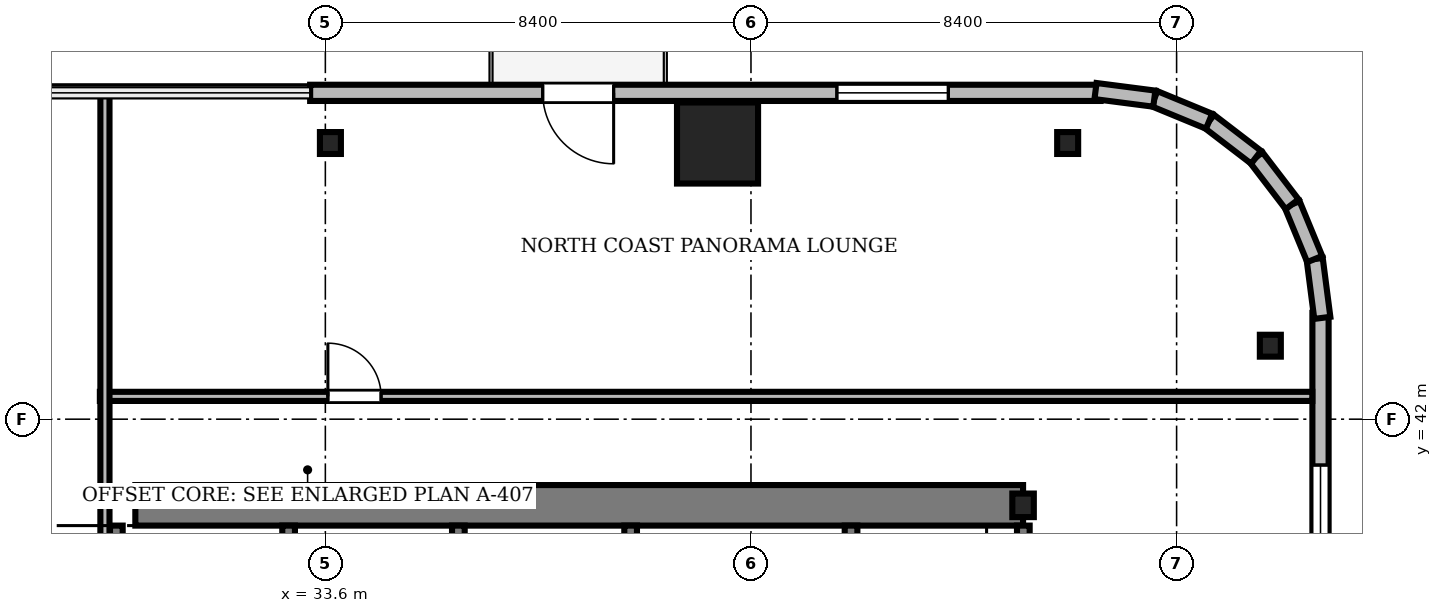
"""IFC4 building model, lengths in metres.
Left out: names, types, materials, properties, quantities, classifications, styles, units other than length and angle.
Written with IfcOpenShell. Run it as: python <this file> out.ifc"""

import sys

from ifc_helpers import new_model, si_unit, direction, frame, frame_2d, origin, origin_2d, place, context, subcontext, project, spatial, rectangle, i_section, extrude, source, transform, mapped, element, fill, save


model = new_model("IFC4")
c1 = context("Model", 3, precision=1e-05, world=origin(), true_north=direction((0.0, 1.0)))
c2 = subcontext(c1, "Body", "Model", "MODEL_VIEW")
j1 = project(units=[si_unit("LENGTHUNIT", "METRE"), si_unit("PLANEANGLEUNIT", "RADIAN")], contexts=[c1])
p1 = place(None, origin())
s1 = spatial("IfcSite", under=j1, at=p1, CompositionType="ELEMENT")
p2 = place(p1, origin())
s2 = spatial("IfcBuilding", under=s1, at=p2, CompositionType="ELEMENT")
p3 = place(p2, frame((0.0, 0.0, 107.5)))
s3 = spatial("IfcBuildingStorey", under=s2, at=p3, CompositionType="ELEMENT", Elevation=107.5)
m1 = source(origin(), c2, "Body", "SweptSolid", [
    extrude(rectangle(XDim=17.52, YDim=0.8, at=frame_2d((8.76, 0.0))), origin(), (0.0, 0.0, 1.0), 3.56),
])
p4 = place(p3, frame((29.85, 40.3, 0.0), z_axis=(0.0, 0.0, 1.0), x_axis=(1.0, 0.0, 0.0)))
e1 = element("IfcWall", 1, at=p4, inside=s3, PredefinedType="SHEAR", context=c2, shape_type="MappedRepresentation", body=[
    mapped(m1, transform((0.0, 0.0, 0.0), scale=1.0)),
])
m2 = source(origin(), c2, "Body", "SweptSolid", [
    extrude(i_section(OverallWidth=0.424, OverallDepth=0.465, WebThickness=0.035, FlangeThickness=0.056, FilletRadius=0.015, at=origin_2d()), origin(), (0.0, 0.0, 1.0), 3.56),
])
p5 = place(p3, frame((47.37, 40.3, 0.0), z_axis=(0.0, 0.0, 1.0), x_axis=(1.0, 0.0, 0.0)))
e2 = element("IfcColumn", 2, at=p5, inside=s3, PredefinedType="COLUMN", context=c2, shape_type="MappedRepresentation", body=[
    mapped(m2, transform((0.0, 0.0, 0.0), scale=1.0)),
])
m3 = source(origin(), c2, "Body", "SweptSolid", [
    extrude(rectangle(XDim=1.6, YDim=1.6, at=origin_2d()), origin(), (0.0, 0.0, 1.0), 3.56),
])
p6 = place(p3, frame((41.34, 47.45, 0.0), z_axis=(0.0, 0.0, 1.0), x_axis=(1.0, 0.0, 0.0)))
e3 = element("IfcColumn", 3, at=p6, inside=s3, PredefinedType="COLUMN", context=c2, shape_type="MappedRepresentation", body=[
    mapped(m3, transform((0.0, 0.0, 0.0), scale=1.0)),
])
m4 = source(origin(), c2, "Body", "SweptSolid", [
    extrude(i_section(OverallWidth=0.414, OverallDepth=0.432, WebThickness=0.026, FlangeThickness=0.04, FilletRadius=0.015, at=origin_2d()), origin(), (0.0, 0.0, 1.0), 3.56),
])
for number, where, z_axis, x_axis in (
    (4, (52.25, 43.45, 0.0), (0.0, 0.0, 1.0), (1.0, 0.0, 0.0)),
    (5, (48.25, 47.45, 0.0), (0.0, 0.0, 1.0), (1.0, 0.0, 0.0)),
    (6, (33.7, 47.45, 0.0), (0.0, 0.0, 1.0), (1.0, 0.0, 0.0)),
):
    element("IfcColumn", number, at=place(p3, frame(where, z_axis=z_axis, x_axis=x_axis)), inside=s3, PredefinedType="COLUMN", context=c2, shape_type="MappedRepresentation", body=[
        mapped(m4, transform((0.0, 0.0, 0.0), scale=1.0)),
    ])
m5 = source(origin(), c2, "Body", "SweptSolid", [
    extrude(rectangle(XDim=15.6, YDim=0.32, at=frame_2d((7.8, 0.0))), origin(), (0.0, 0.0, 1.0), 3.56),
])
p7 = place(p3, frame((48.9, 48.44, 0.0), z_axis=(0.0, 0.0, 1.0), x_axis=(-1.0, 0.0, 0.0)))
e7 = element("IfcWall", 7, at=p7, inside=s3, PredefinedType="SOLIDWALL", context=c2, shape_type="MappedRepresentation", body=[
    mapped(m5, transform((0.0, 0.0, 0.0), scale=1.0)),
])
m6 = source(origin(), c2, "Body", "SweptSolid", [
    extrude(rectangle(XDim=1.4, YDim=2.3, at=frame_2d((0.7, 1.15))), frame((0.0, 0.17, 0.0), z_axis=(0.0, -1.0, 0.0), x_axis=(1.0, 0.0, 0.0)), (0.0, 0.0, 1.0), 0.34),
])
p8 = place(p7, frame((9.61, 0.0, 0.0)))
e8 = element("IfcOpeningElement", 8, at=p8, cuts=e7, PredefinedType="OPENING", context=c2, shape_type="MappedRepresentation", body=[
    mapped(m6, transform((0.0, 0.0, 0.0), scale=1.0)),
])
m7 = source(origin(), c2, "Body", "SweptSolid", [
    extrude(rectangle(XDim=2.2, YDim=2.4, at=frame_2d((1.1, 1.2))), frame((0.0, 0.17, 0.0), z_axis=(0.0, -1.0, 0.0), x_axis=(1.0, 0.0, 0.0)), (0.0, 0.0, 1.0), 0.34),
])
p9 = place(p7, frame((3.005, 0.0, 0.72)))
e9 = element("IfcOpeningElement", 9, at=p9, cuts=e7, PredefinedType="OPENING", context=c2, shape_type="MappedRepresentation", body=[
    mapped(m7, transform((0.0, 0.0, 0.0), scale=1.0)),
])
m8 = source(origin(), c2, "Body", "SweptSolid", [
    extrude(rectangle(XDim=15.6, YDim=0.32, at=frame_2d((7.8, 0.0))), origin(), (0.0, 0.0, 1.0), 3.56),
])
p10 = place(p3, frame((53.24, 28.5, 0.0), z_axis=(0.0, 0.0, 1.0), x_axis=(0.0, 1.0, 0.0)))
e10 = element("IfcWall", 10, at=p10, inside=s3, PredefinedType="SOLIDWALL", context=c2, shape_type="MappedRepresentation", body=[
    mapped(m8, transform((0.0, 0.0, 0.0), scale=1.0)),
])
p11 = place(p10, frame((10.395, 0.0, 0.72)))
e11 = element("IfcOpeningElement", 11, at=p11, cuts=e10, PredefinedType="OPENING", context=c2, shape_type="MappedRepresentation", body=[
    mapped(m7, transform((0.0, 0.0, 0.0), scale=1.0)),
])
m9 = source(origin(), c2, "Body", "SweptSolid", [
    extrude(rectangle(XDim=1.17, YDim=0.32, at=frame_2d((0.585, 0.0))), origin(), (0.0, 0.0, 1.0), 3.56),
])
p12 = place(p3, frame((53.276, 44.0, 0.0), z_axis=(0.0, 0.0, 1.0), x_axis=(-0.128295670475, 0.991735963317, 0.0)))
e12 = element("IfcWall", 12, at=p12, inside=s3, PredefinedType="SOLIDWALL", context=c2, shape_type="MappedRepresentation", body=[
    mapped(m9, transform((0.0, 0.0, 0.0), scale=1.0)),
])
m10 = source(origin(), c2, "Body", "SweptSolid", [
    extrude(rectangle(XDim=1.169, YDim=0.32, at=frame_2d((0.584, 0.0))), origin(), (0.0, 0.0, 1.0), 3.56),
])
p13 = place(p3, frame((53.125, 45.16, 0.0), z_axis=(0.0, 0.0, 1.0), x_axis=(-0.381054331552, 0.924552646638, 0.0)))
e13 = element("IfcWall", 13, at=p13, inside=s3, PredefinedType="SOLIDWALL", context=c2, shape_type="MappedRepresentation", body=[
    mapped(m10, transform((0.0, 0.0, 0.0), scale=1.0)),
])
m11 = source(origin(), c2, "Body", "SweptSolid", [
    extrude(rectangle(XDim=1.169, YDim=0.32, at=frame_2d((0.584, 0.0))), origin(), (0.0, 0.0, 1.0), 3.56),
])
p14 = place(p3, frame((52.68, 46.241, 0.0), z_axis=(0.0, 0.0, 1.0), x_axis=(-0.608387696831, 0.793639975269, 0.0)))
e14 = element("IfcWall", 14, at=p14, inside=s3, PredefinedType="SOLIDWALL", context=c2, shape_type="MappedRepresentation", body=[
    mapped(m11, transform((0.0, 0.0, 0.0), scale=1.0)),
])
m12 = source(origin(), c2, "Body", "SweptSolid", [
    extrude(rectangle(XDim=1.169, YDim=0.32, at=frame_2d((0.584, 0.0))), origin(), (0.0, 0.0, 1.0), 3.56),
])
p15 = place(p3, frame((51.969, 47.169, 0.0), z_axis=(0.0, 0.0, 1.0), x_axis=(-0.793663520347, 0.608356981114, 0.0)))
e15 = element("IfcWall", 15, at=p15, inside=s3, PredefinedType="SOLIDWALL", context=c2, shape_type="MappedRepresentation", body=[
    mapped(m12, transform((0.0, 0.0, 0.0), scale=1.0)),
])
p16 = place(p3, frame((51.041, 47.88, 0.0), z_axis=(0.0, 0.0, 1.0), x_axis=(-0.924552646638, 0.381054331552, 0.0)))
e16 = element("IfcWall", 16, at=p16, inside=s3, PredefinedType="SOLIDWALL", context=c2, shape_type="MappedRepresentation", body=[
    mapped(m10, transform((0.0, 0.0, 0.0), scale=1.0)),
])
p17 = place(p3, frame((49.96, 48.325, 0.0), z_axis=(0.0, 0.0, 1.0), x_axis=(-0.991735963317, 0.128295670475, 0.0)))
e17 = element("IfcWall", 17, at=p17, inside=s3, PredefinedType="SOLIDWALL", context=c2, shape_type="MappedRepresentation", body=[
    mapped(m9, transform((0.0, 0.0, 0.0), scale=1.0)),
])
m13 = source(origin(), c2, "Body", "SweptSolid", [
    extrude(rectangle(XDim=9.25, YDim=0.25, at=frame_2d((4.625, 0.0))), origin(), (0.0, 0.0, 1.0), 3.6),
])
for number, where, z_axis, x_axis in (
    (18, (29.475, 30.65, 0.0), (0.0, 0.0, 1.0), (0.0, 1.0, 0.0)),
    (19, (32.875, 30.65, 0.0), (0.0, 0.0, 1.0), (0.0, 1.0, 0.0)),
    (20, (36.225, 30.65, 0.0), (0.0, 0.0, 1.0), (0.0, 1.0, 0.0)),
    (21, (39.625, 30.65, 0.0), (0.0, 0.0, 1.0), (0.0, 1.0, 0.0)),
    (22, (43.975, 30.65, 0.0), (0.0, 0.0, 1.0), (0.0, 1.0, 0.0)),
    (23, (47.375, 30.65, 0.0), (0.0, 0.0, 1.0), (0.0, 1.0, 0.0)),
):
    element("IfcWall", number, at=place(p3, frame(where, z_axis=z_axis, x_axis=x_axis)), inside=s3, PredefinedType="SOLIDWALL", context=c2, shape_type="MappedRepresentation", body=[
        mapped(m13, transform((0.0, 0.0, 0.0), scale=1.0)),
    ])
m14 = source(origin(), c2, "Body", "SweptSolid", [
    extrude(rectangle(XDim=23.928, YDim=0.18, at=frame_2d((11.964, 0.0))), origin(), (0.0, 0.0, 1.0), 2.802),
])
p18 = place(p3, frame((29.15, 42.45, 0.0), z_axis=(0.0, 0.0, 1.0), x_axis=(1.0, 0.0, 0.0)))
e24 = element("IfcWall", 24, at=p18, inside=s3, PredefinedType="PARTITIONING", context=c2, shape_type="MappedRepresentation", body=[
    mapped(m14, transform((0.0, 0.0, 0.0), scale=1.0)),
])
m15 = source(origin(), c2, "Body", "SweptSolid", [
    extrude(rectangle(XDim=1.05, YDim=2.2, at=frame_2d((0.525, 1.1))), frame((0.0, 0.1, 0.0), z_axis=(0.0, -1.0, 0.0), x_axis=(1.0, 0.0, 0.0)), (0.0, 0.0, 1.0), 0.2),
])
p19 = place(p18, frame((4.5, 0.0, 0.0)))
e25 = element("IfcOpeningElement", 25, at=p19, cuts=e24, PredefinedType="OPENING", context=c2, shape_type="MappedRepresentation", body=[
    mapped(m15, transform((0.0, 0.0, 0.0), scale=1.0)),
])
m16 = source(origin(), c2, "Body", "SweptSolid", [
    extrude(rectangle(XDim=11.45, YDim=0.18, at=frame_2d((5.725, 0.0))), origin(), (0.0, 0.0, 1.0), 2.802),
])
p20 = place(p3, frame((29.25, 37.02, 0.0), z_axis=(0.0, 0.0, 1.0), x_axis=(0.0, 1.0, 0.0)))
e26 = element("IfcWall", 26, at=p20, inside=s3, PredefinedType="PARTITIONING", context=c2, shape_type="MappedRepresentation", body=[
    mapped(m16, transform((0.0, 0.0, 0.0), scale=1.0)),
])
m17 = source(origin(), c2, "Body", "SweptSolid", [
    extrude(rectangle(XDim=1.4, YDim=2.3, at=frame_2d((0.7, 1.15))), frame((0.0, 0.025, 0.0), z_axis=(0.0, -1.0, 0.0), x_axis=(1.0, 0.0, 0.0)), (0.0, 0.0, 1.0), 0.05),
])
p21 = place(p8, frame((1.4, 0.0, 0.0), z_axis=(0.0, 0.0, 1.0), x_axis=(-1.0, 0.0, 0.0)))
e27 = element("IfcDoor", 27, at=p21, inside=s3, OperationType="DOUBLE_DOOR_SLIDING", PredefinedType="DOOR", context=c2, shape_type="MappedRepresentation", body=[
    mapped(m17, transform((0.0, 0.0, 0.0), scale=1.0)),
])
fill(e8, e27)
m18 = source(origin(), c2, "Body", "SweptSolid", [
    extrude(rectangle(XDim=2.2, YDim=2.4, at=frame_2d((1.1, 1.2))), frame((0.0, 0.03, 0.0), z_axis=(0.0, -1.0, 0.0), x_axis=(1.0, 0.0, 0.0)), (0.0, 0.0, 1.0), 0.06),
])
p22 = place(p9, origin())
e28 = element("IfcWindow", 28, at=p22, inside=s3, PartitioningType="SINGLE_PANEL", PredefinedType="WINDOW", context=c2, shape_type="MappedRepresentation", body=[
    mapped(m18, transform((0.0, 0.0, 0.0), scale=1.0)),
])
fill(e9, e28)
p23 = place(p11, origin())
e29 = element("IfcWindow", 29, at=p23, inside=s3, PartitioningType="SINGLE_PANEL", PredefinedType="WINDOW", context=c2, shape_type="MappedRepresentation", body=[
    mapped(m18, transform((0.0, 0.0, 0.0), scale=1.0)),
])
fill(e11, e29)
m19 = source(origin(), c2, "Body", "SweptSolid", [
    extrude(rectangle(XDim=1.05, YDim=2.2, at=frame_2d((0.525, 1.1))), frame((0.0, 0.025, 0.0), z_axis=(0.0, -1.0, 0.0), x_axis=(1.0, 0.0, 0.0)), (0.0, 0.0, 1.0), 0.05),
])
p24 = place(p19, origin())
e30 = element("IfcDoor", 30, at=p24, inside=s3, OperationType="SINGLE_SWING_LEFT", PredefinedType="DOOR", context=c2, shape_type="MappedRepresentation", body=[
    mapped(m19, transform((0.0, 0.0, 0.0), scale=1.0)),
])
fill(e25, e30)
save(model, sys.argv[1])
